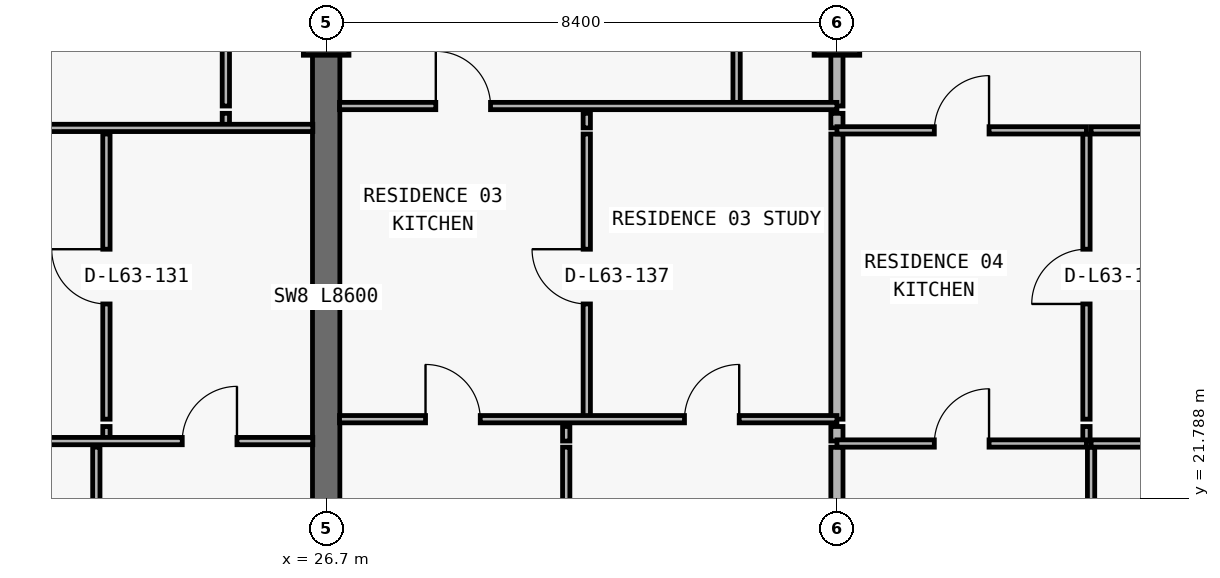
"""IFC4 building model, lengths in metres.
Left out: names, types, materials, properties, quantities, classifications, styles, units other than length and angle.
Written with IfcOpenShell. Run it as: python <this file> out.ifc"""

import sys

from ifc_helpers import new_model, si_unit, direction, frame, frame_2d, origin, origin_2d, place, context, subcontext, project, spatial, rectangle, extrude, element, fill, save


model = new_model("IFC4")
c1 = context("Model", 3, precision=1e-05, world=origin(), true_north=direction((0.0, 1.0)))
c2 = subcontext(c1, "Body", "Model", "MODEL_VIEW")
j1 = project(units=[si_unit("LENGTHUNIT", "METRE"), si_unit("PLANEANGLEUNIT", "RADIAN")], contexts=[c1])
p1 = place(None, origin())
s1 = spatial("IfcSite", under=j1, at=p1, CompositionType="ELEMENT")
p2 = place(p1, origin())
s2 = spatial("IfcBuilding", under=s1, at=p2, CompositionType="ELEMENT")
p3 = place(p2, frame((0.0, 0.0, 226.5)))
s3 = spatial("IfcBuildingStorey", under=s2, at=p3, CompositionType="ELEMENT", Elevation=226.5)
for number, where, z_axis, x_axis in (
    (1, (26.7, 29.4, 0.0), (0.0, 0.0, 1.0), (1.0, 0.0, 0.0)),
    (2, (35.1, 29.4, 0.0), (0.0, 0.0, 1.0), (1.0, 0.0, 0.0)),
):
    element("IfcColumn", number, at=place(p3, frame(where, z_axis=z_axis, x_axis=x_axis)), inside=s3, PredefinedType="COLUMN", context=c2, shape_type="SweptSolid", body=[
        extrude(rectangle(XDim=0.75, YDim=0.65, at=origin_2d()), origin(), (0.0, 0.0, 1.0), 3.05),
    ])
p4 = place(p3, frame((26.7, 20.8, 0.0), z_axis=(0.0, 0.0, 1.0), x_axis=(0.0, 1.0, 0.0)))
e3 = element("IfcWall", 3, at=p4, inside=s3, PredefinedType="SHEAR", context=c2, shape_type="SweptSolid", body=[
    extrude(rectangle(XDim=8.6, YDim=0.45, at=frame_2d((4.3, 0.0))), origin(), (0.0, 0.0, 1.0), 3.05),
])
p5 = place(p3, frame((22.92, 13.34, 0.0), z_axis=(0.0, 0.0, 1.0), x_axis=(0.0, 1.0, 0.0)))
e4 = element("IfcWall", 4, at=p5, inside=s3, PredefinedType="PARTITIONING", context=c2, shape_type="SweptSolid", body=[
    extrude(rectangle(XDim=9.29, YDim=0.12, at=frame_2d((4.645, 0.0))), origin(), (0.0, 0.0, 1.0), 3.05),
])
p6 = place(p3, frame((23.086, 22.73, 0.0), z_axis=(0.0, 0.0, 1.0), x_axis=(0.0, 1.0, 0.0)))
e5 = element("IfcWall", 5, at=p6, inside=s3, PredefinedType="PARTITIONING", context=c2, shape_type="SweptSolid", body=[
    extrude(rectangle(XDim=0.24, YDim=0.12, at=frame_2d((0.12, 0.0))), origin(), (0.0, 0.0, 1.0), 3.05),
])
p7 = place(p3, frame((23.086, 23.09, 0.0), z_axis=(0.0, 0.0, 1.0), x_axis=(0.0, 1.0, 0.0)))
e6 = element("IfcWall", 6, at=p7, inside=s3, PredefinedType="PARTITIONING", context=c2, shape_type="SweptSolid", body=[
    extrude(rectangle(XDim=4.69, YDim=0.12, at=frame_2d((2.345, 0.0))), origin(), (0.0, 0.0, 1.0), 3.05),
])
p8 = place(p7, frame((1.895, 0.0, 0.0)))
e7 = element("IfcOpeningElement", 7, at=p8, cuts=e6, PredefinedType="OPENING", context=c2, shape_type="SweptSolid", body=[
    extrude(rectangle(XDim=0.9, YDim=2.15, at=frame_2d((0.45, 1.075))), frame((0.0, 0.07, 0.0), z_axis=(0.0, -1.0, 0.0), x_axis=(1.0, 0.0, 0.0)), (0.0, 0.0, 1.0), 0.14),
])
p9 = place(p3, frame((25.05, 27.88, 0.0), z_axis=(0.0, 0.0, 1.0), x_axis=(0.0, 1.0, 0.0)))
e8 = element("IfcWall", 8, at=p9, inside=s3, PredefinedType="PARTITIONING", context=c2, shape_type="SweptSolid", body=[
    extrude(rectangle(XDim=0.24, YDim=0.12, at=frame_2d((0.12, 0.0))), origin(), (0.0, 0.0, 1.0), 3.05),
])
p10 = place(p3, frame((25.05, 28.24, 0.0), z_axis=(0.0, 0.0, 1.0), x_axis=(0.0, 1.0, 0.0)))
e9 = element("IfcWall", 9, at=p10, inside=s3, PredefinedType="PARTITIONING", context=c2, shape_type="SweptSolid", body=[
    extrude(rectangle(XDim=6.26, YDim=0.12, at=frame_2d((3.13, 0.0))), origin(), (0.0, 0.0, 1.0), 3.05),
])
p11 = place(p10, frame((2.705, 0.0, 0.0)))
e10 = element("IfcOpeningElement", 10, at=p11, cuts=e9, PredefinedType="OPENING", context=c2, shape_type="SweptSolid", body=[
    extrude(rectangle(XDim=0.85, YDim=2.1, at=frame_2d((0.425, 1.05))), frame((0.0, 0.07, 0.0), z_axis=(0.0, -1.0, 0.0), x_axis=(1.0, 0.0, 0.0)), (0.0, 0.0, 1.0), 0.14),
])
p12 = place(p3, frame((30.648, 13.34, 0.0), z_axis=(0.0, 0.0, 1.0), x_axis=(0.0, 1.0, 0.0)))
e11 = element("IfcWall", 11, at=p12, inside=s3, PredefinedType="PARTITIONING", context=c2, shape_type="SweptSolid", body=[
    extrude(rectangle(XDim=9.29, YDim=0.12, at=frame_2d((4.645, 0.0))), origin(), (0.0, 0.0, 1.0), 3.05),
])
p13 = place(p3, frame((30.648, 22.73, 0.0), z_axis=(0.0, 0.0, 1.0), x_axis=(0.0, 1.0, 0.0)))
e12 = element("IfcWall", 12, at=p13, inside=s3, PredefinedType="PARTITIONING", context=c2, shape_type="SweptSolid", body=[
    extrude(rectangle(XDim=0.24, YDim=0.12, at=frame_2d((0.12, 0.0))), origin(), (0.0, 0.0, 1.0), 3.05),
])
p14 = place(p3, frame((30.986, 23.09, 0.0), z_axis=(0.0, 0.0, 1.0), x_axis=(0.0, 1.0, 0.0)))
e13 = element("IfcWall", 13, at=p14, inside=s3, PredefinedType="PARTITIONING", context=c2, shape_type="SweptSolid", body=[
    extrude(rectangle(XDim=4.69, YDim=0.12, at=frame_2d((2.345, 0.0))), origin(), (0.0, 0.0, 1.0), 2.629),
])
p15 = place(p14, frame((1.895, 0.0, 0.0)))
e14 = element("IfcOpeningElement", 14, at=p15, cuts=e13, PredefinedType="OPENING", context=c2, shape_type="SweptSolid", body=[
    extrude(rectangle(XDim=0.9, YDim=2.15, at=frame_2d((0.45, 1.075))), frame((0.0, 0.07, 0.0), z_axis=(0.0, -1.0, 0.0), x_axis=(1.0, 0.0, 0.0)), (0.0, 0.0, 1.0), 0.14),
])
p16 = place(p3, frame((30.986, 27.88, 0.0), z_axis=(0.0, 0.0, 1.0), x_axis=(0.0, 1.0, 0.0)))
e15 = element("IfcWall", 15, at=p16, inside=s3, PredefinedType="PARTITIONING", context=c2, shape_type="SweptSolid", body=[
    extrude(rectangle(XDim=0.24, YDim=0.12, at=frame_2d((0.12, 0.0))), origin(), (0.0, 0.0, 1.0), 2.629),
])
p17 = place(p3, frame((33.45, 28.24, 0.0), z_axis=(0.0, 0.0, 1.0), x_axis=(0.0, 1.0, 0.0)))
e16 = element("IfcWall", 16, at=p17, inside=s3, PredefinedType="PARTITIONING", context=c2, shape_type="SweptSolid", body=[
    extrude(rectangle(XDim=6.26, YDim=0.12, at=frame_2d((3.13, 0.0))), origin(), (0.0, 0.0, 1.0), 3.05),
])
p18 = place(p17, frame((2.705, 0.0, 0.0)))
e17 = element("IfcOpeningElement", 17, at=p18, cuts=e16, PredefinedType="OPENING", context=c2, shape_type="SweptSolid", body=[
    extrude(rectangle(XDim=0.85, YDim=2.1, at=frame_2d((0.425, 1.05))), frame((0.0, 0.07, 0.0), z_axis=(0.0, -1.0, 0.0), x_axis=(1.0, 0.0, 0.0)), (0.0, 0.0, 1.0), 0.14),
])
p19 = place(p3, frame((35.1, 13.34, 0.0), z_axis=(0.0, 0.0, 1.0), x_axis=(0.0, 1.0, 0.0)))
e18 = element("IfcWall", 18, at=p19, inside=s3, PredefinedType="PARTITIONING", context=c2, shape_type="SweptSolid", body=[
    extrude(rectangle(XDim=9.29, YDim=0.2, at=frame_2d((4.645, 0.0))), origin(), (0.0, 0.0, 1.0), 2.263),
])
p20 = place(p3, frame((35.1, 22.73, 0.0), z_axis=(0.0, 0.0, 1.0), x_axis=(0.0, 1.0, 0.0)))
e19 = element("IfcWall", 19, at=p20, inside=s3, PredefinedType="PARTITIONING", context=c2, shape_type="SweptSolid", body=[
    extrude(rectangle(XDim=0.24, YDim=0.2, at=frame_2d((0.12, 0.0))), origin(), (0.0, 0.0, 1.0), 2.263),
])
p21 = place(p3, frame((35.1, 23.09, 0.0), z_axis=(0.0, 0.0, 1.0), x_axis=(0.0, 1.0, 0.0)))
e20 = element("IfcWall", 20, at=p21, inside=s3, PredefinedType="PARTITIONING", context=c2, shape_type="SweptSolid", body=[
    extrude(rectangle(XDim=4.69, YDim=0.2, at=frame_2d((2.345, 0.0))), origin(), (0.0, 0.0, 1.0), 2.263),
])
p22 = place(p3, frame((35.1, 27.88, 0.0), z_axis=(0.0, 0.0, 1.0), x_axis=(0.0, 1.0, 0.0)))
e21 = element("IfcWall", 21, at=p22, inside=s3, PredefinedType="PARTITIONING", context=c2, shape_type="SweptSolid", body=[
    extrude(rectangle(XDim=0.24, YDim=0.2, at=frame_2d((0.12, 0.0))), origin(), (0.0, 0.0, 1.0), 2.263),
])
p23 = place(p3, frame((35.1, 28.24, 0.0), z_axis=(0.0, 0.0, 1.0), x_axis=(0.0, 1.0, 0.0)))
e22 = element("IfcWall", 22, at=p23, inside=s3, PredefinedType="PARTITIONING", context=c2, shape_type="SweptSolid", body=[
    extrude(rectangle(XDim=6.26, YDim=0.2, at=frame_2d((3.13, 0.0))), origin(), (0.0, 0.0, 1.0), 2.263),
])
p24 = place(p3, frame((39.204, 22.73, 0.0), z_axis=(0.0, 0.0, 1.0), x_axis=(0.0, 1.0, 0.0)))
e23 = element("IfcWall", 23, at=p24, inside=s3, PredefinedType="PARTITIONING", context=c2, shape_type="SweptSolid", body=[
    extrude(rectangle(XDim=0.24, YDim=0.12, at=frame_2d((0.12, 0.0))), origin(), (0.0, 0.0, 1.0), 3.05),
])
p25 = place(p3, frame((39.204, 23.09, 0.0), z_axis=(0.0, 0.0, 1.0), x_axis=(0.0, 1.0, 0.0)))
e24 = element("IfcWall", 24, at=p25, inside=s3, PredefinedType="PARTITIONING", context=c2, shape_type="SweptSolid", body=[
    extrude(rectangle(XDim=4.69, YDim=0.12, at=frame_2d((2.345, 0.0))), origin(), (0.0, 0.0, 1.0), 3.05),
])
p26 = place(p25, frame((1.895, 0.0, 0.0)))
e25 = element("IfcOpeningElement", 25, at=p26, cuts=e24, PredefinedType="OPENING", context=c2, shape_type="SweptSolid", body=[
    extrude(rectangle(XDim=0.9, YDim=2.15, at=frame_2d((0.45, 1.075))), frame((0.0, 0.07, 0.0), z_axis=(0.0, -1.0, 0.0), x_axis=(1.0, 0.0, 0.0)), (0.0, 0.0, 1.0), 0.14),
])
p27 = place(p3, frame((39.28, 13.34, 0.0), z_axis=(0.0, 0.0, 1.0), x_axis=(0.0, 1.0, 0.0)))
e26 = element("IfcWall", 26, at=p27, inside=s3, PredefinedType="PARTITIONING", context=c2, shape_type="SweptSolid", body=[
    extrude(rectangle(XDim=9.29, YDim=0.12, at=frame_2d((4.645, 0.0))), origin(), (0.0, 0.0, 1.0), 3.05),
])
p28 = place(p3, frame((35.1, 22.69, 0.0), z_axis=(0.0, 0.0, 1.0), x_axis=(1.0, 0.0, 0.0)))
e27 = element("IfcWall", 27, at=p28, inside=s3, PredefinedType="PARTITIONING", context=c2, shape_type="SweptSolid", body=[
    extrude(rectangle(XDim=4.104, YDim=0.12, at=frame_2d((2.052, 0.0))), origin(), (0.0, 0.0, 1.0), 3.05),
])
p29 = place(p28, frame((1.602, 0.0, 0.0)))
e28 = element("IfcOpeningElement", 28, at=p29, cuts=e27, PredefinedType="OPENING", context=c2, shape_type="SweptSolid", body=[
    extrude(rectangle(XDim=0.9, YDim=2.15, at=frame_2d((0.45, 1.075))), frame((0.0, 0.07, 0.0), z_axis=(0.0, -1.0, 0.0), x_axis=(1.0, 0.0, 0.0)), (0.0, 0.0, 1.0), 0.14),
])
p30 = place(p3, frame((39.28, 22.69, 0.0), z_axis=(0.0, 0.0, 1.0), x_axis=(1.0, 0.0, 0.0)))
e29 = element("IfcWall", 29, at=p30, inside=s3, PredefinedType="PARTITIONING", context=c2, shape_type="SweptSolid", body=[
    extrude(rectangle(XDim=3.42, YDim=0.12, at=frame_2d((1.71, 0.0))), origin(), (0.0, 0.0, 1.0), 3.05),
])
p31 = place(p30, frame((1.26, 0.0, 0.0)))
e30 = element("IfcOpeningElement", 30, at=p31, cuts=e29, PredefinedType="OPENING", context=c2, shape_type="SweptSolid", body=[
    extrude(rectangle(XDim=0.9, YDim=2.15, at=frame_2d((0.45, 1.075))), frame((0.0, 0.07, 0.0), z_axis=(0.0, -1.0, 0.0), x_axis=(1.0, 0.0, 0.0)), (0.0, 0.0, 1.0), 0.14),
])
p32 = place(p3, frame((18.3, 22.73, 0.0), z_axis=(0.0, 0.0, 1.0), x_axis=(1.0, 0.0, 0.0)))
e31 = element("IfcWall", 31, at=p32, inside=s3, PredefinedType="PARTITIONING", context=c2, shape_type="SweptSolid", body=[
    extrude(rectangle(XDim=8.18, YDim=0.12, at=frame_2d((4.09, 0.0))), origin(), (0.0, 0.0, 1.0), 3.05),
])
p33 = place(p32, frame((1.86, 0.0, 0.0)))
e32 = element("IfcOpeningElement", 32, at=p33, cuts=e31, PredefinedType="OPENING", context=c2, shape_type="SweptSolid", body=[
    extrude(rectangle(XDim=0.9, YDim=2.15, at=frame_2d((0.45, 1.075))), frame((0.0, 0.07, 0.0), z_axis=(0.0, -1.0, 0.0), x_axis=(1.0, 0.0, 0.0)), (0.0, 0.0, 1.0), 0.14),
])
p34 = place(p32, frame((6.033, 0.0, 0.0)))
e33 = element("IfcOpeningElement", 33, at=p34, cuts=e31, PredefinedType="OPENING", context=c2, shape_type="SweptSolid", body=[
    extrude(rectangle(XDim=0.9, YDim=2.15, at=frame_2d((0.45, 1.075))), frame((0.0, 0.07, 0.0), z_axis=(0.0, -1.0, 0.0), x_axis=(1.0, 0.0, 0.0)), (0.0, 0.0, 1.0), 0.14),
])
p35 = place(p3, frame((26.92, 23.09, 0.0), z_axis=(0.0, 0.0, 1.0), x_axis=(1.0, 0.0, 0.0)))
e34 = element("IfcWall", 34, at=p35, inside=s3, PredefinedType="PARTITIONING", context=c2, shape_type="SweptSolid", body=[
    extrude(rectangle(XDim=8.18, YDim=0.12, at=frame_2d((4.09, 0.0))), origin(), (0.0, 0.0, 1.0), 3.05),
])
p36 = place(p35, frame((1.414, 0.0, 0.0)))
e35 = element("IfcOpeningElement", 35, at=p36, cuts=e34, PredefinedType="OPENING", context=c2, shape_type="SweptSolid", body=[
    extrude(rectangle(XDim=0.9, YDim=2.15, at=frame_2d((0.45, 1.075))), frame((0.0, 0.07, 0.0), z_axis=(0.0, -1.0, 0.0), x_axis=(1.0, 0.0, 0.0)), (0.0, 0.0, 1.0), 0.14),
])
p37 = place(p35, frame((5.673, 0.0, 0.0)))
e36 = element("IfcOpeningElement", 36, at=p37, cuts=e34, PredefinedType="OPENING", context=c2, shape_type="SweptSolid", body=[
    extrude(rectangle(XDim=0.9, YDim=2.15, at=frame_2d((0.45, 1.075))), frame((0.0, 0.07, 0.0), z_axis=(0.0, -1.0, 0.0), x_axis=(1.0, 0.0, 0.0)), (0.0, 0.0, 1.0), 0.14),
])
p38 = place(p3, frame((35.1, 27.84, 0.0), z_axis=(0.0, 0.0, 1.0), x_axis=(1.0, 0.0, 0.0)))
e37 = element("IfcWall", 37, at=p38, inside=s3, PredefinedType="PARTITIONING", context=c2, shape_type="SweptSolid", body=[
    extrude(rectangle(XDim=4.104, YDim=0.12, at=frame_2d((2.052, 0.0))), origin(), (0.0, 0.0, 1.0), 3.05),
])
p39 = place(p38, frame((1.602, 0.0, 0.0)))
e38 = element("IfcOpeningElement", 38, at=p39, cuts=e37, PredefinedType="OPENING", context=c2, shape_type="SweptSolid", body=[
    extrude(rectangle(XDim=0.9, YDim=2.15, at=frame_2d((0.45, 1.075))), frame((0.0, 0.07, 0.0), z_axis=(0.0, -1.0, 0.0), x_axis=(1.0, 0.0, 0.0)), (0.0, 0.0, 1.0), 0.14),
])
p40 = place(p3, frame((39.28, 27.84, 0.0), z_axis=(0.0, 0.0, 1.0), x_axis=(1.0, 0.0, 0.0)))
e39 = element("IfcWall", 39, at=p40, inside=s3, PredefinedType="PARTITIONING", context=c2, shape_type="SweptSolid", body=[
    extrude(rectangle(XDim=3.42, YDim=0.12, at=frame_2d((1.71, 0.0))), origin(), (0.0, 0.0, 1.0), 3.05),
])
p41 = place(p3, frame((18.3, 27.88, 0.0), z_axis=(0.0, 0.0, 1.0), x_axis=(1.0, 0.0, 0.0)))
e40 = element("IfcWall", 40, at=p41, inside=s3, PredefinedType="PARTITIONING", context=c2, shape_type="SweptSolid", body=[
    extrude(rectangle(XDim=8.18, YDim=0.12, at=frame_2d((4.09, 0.0))), origin(), (0.0, 0.0, 1.0), 3.05),
])
p42 = place(p41, frame((1.943, 0.0, 0.0)))
e41 = element("IfcOpeningElement", 41, at=p42, cuts=e40, PredefinedType="OPENING", context=c2, shape_type="SweptSolid", body=[
    extrude(rectangle(XDim=0.9, YDim=2.15, at=frame_2d((0.45, 1.075))), frame((0.0, 0.07, 0.0), z_axis=(0.0, -1.0, 0.0), x_axis=(1.0, 0.0, 0.0)), (0.0, 0.0, 1.0), 0.14),
])
p43 = place(p3, frame((26.92, 28.24, 0.0), z_axis=(0.0, 0.0, 1.0), x_axis=(1.0, 0.0, 0.0)))
e42 = element("IfcWall", 42, at=p43, inside=s3, PredefinedType="PARTITIONING", context=c2, shape_type="SweptSolid", body=[
    extrude(rectangle(XDim=8.18, YDim=0.12, at=frame_2d((4.09, 0.0))), origin(), (0.0, 0.0, 1.0), 3.05),
])
p44 = place(p43, frame((1.583, 0.0, 0.0)))
e43 = element("IfcOpeningElement", 43, at=p44, cuts=e42, PredefinedType="OPENING", context=c2, shape_type="SweptSolid", body=[
    extrude(rectangle(XDim=0.9, YDim=2.15, at=frame_2d((0.45, 1.075))), frame((0.0, 0.07, 0.0), z_axis=(0.0, -1.0, 0.0), x_axis=(1.0, 0.0, 0.0)), (0.0, 0.0, 1.0), 0.14),
])
p45 = place(p8, origin())
e44 = element("IfcDoor", 44, at=p45, inside=s3, OperationType="SINGLE_SWING_RIGHT", PredefinedType="DOOR", context=c2, shape_type="SweptSolid", body=[
    extrude(rectangle(XDim=0.9, YDim=2.15, at=frame_2d((0.45, 1.075))), frame((0.0, 0.025, 0.0), z_axis=(0.0, -1.0, 0.0), x_axis=(1.0, 0.0, 0.0)), (0.0, 0.0, 1.0), 0.05),
])
fill(e7, e44)
p46 = place(p34, origin())
e45 = element("IfcDoor", 45, at=p46, inside=s3, OperationType="SINGLE_SWING_RIGHT", PredefinedType="DOOR", context=c2, shape_type="SweptSolid", body=[
    extrude(rectangle(XDim=0.9, YDim=2.15, at=frame_2d((0.45, 1.075))), frame((0.0, 0.025, 0.0), z_axis=(0.0, -1.0, 0.0), x_axis=(1.0, 0.0, 0.0)), (0.0, 0.0, 1.0), 0.05),
])
fill(e33, e45)
p47 = place(p44, origin())
e46 = element("IfcDoor", 46, at=p47, inside=s3, OperationType="SINGLE_SWING_LEFT", PredefinedType="DOOR", context=c2, shape_type="SweptSolid", body=[
    extrude(rectangle(XDim=0.9, YDim=2.15, at=frame_2d((0.45, 1.075))), frame((0.0, 0.025, 0.0), z_axis=(0.0, -1.0, 0.0), x_axis=(1.0, 0.0, 0.0)), (0.0, 0.0, 1.0), 0.05),
])
fill(e43, e46)
p48 = place(p15, origin())
e47 = element("IfcDoor", 47, at=p48, inside=s3, OperationType="SINGLE_SWING_RIGHT", PredefinedType="DOOR", context=c2, shape_type="SweptSolid", body=[
    extrude(rectangle(XDim=0.9, YDim=2.15, at=frame_2d((0.45, 1.075))), frame((0.0, 0.025, 0.0), z_axis=(0.0, -1.0, 0.0), x_axis=(1.0, 0.0, 0.0)), (0.0, 0.0, 1.0), 0.05),
])
fill(e14, e47)
p49 = place(p36, origin())
e48 = element("IfcDoor", 48, at=p49, inside=s3, OperationType="SINGLE_SWING_LEFT", PredefinedType="DOOR", context=c2, shape_type="SweptSolid", body=[
    extrude(rectangle(XDim=0.9, YDim=2.15, at=frame_2d((0.45, 1.075))), frame((0.0, 0.025, 0.0), z_axis=(0.0, -1.0, 0.0), x_axis=(1.0, 0.0, 0.0)), (0.0, 0.0, 1.0), 0.05),
])
fill(e35, e48)
p50 = place(p37, origin())
e49 = element("IfcDoor", 49, at=p50, inside=s3, OperationType="SINGLE_SWING_RIGHT", PredefinedType="DOOR", context=c2, shape_type="SweptSolid", body=[
    extrude(rectangle(XDim=0.9, YDim=2.15, at=frame_2d((0.45, 1.075))), frame((0.0, 0.025, 0.0), z_axis=(0.0, -1.0, 0.0), x_axis=(1.0, 0.0, 0.0)), (0.0, 0.0, 1.0), 0.05),
])
fill(e36, e49)
p51 = place(p39, origin())
e50 = element("IfcDoor", 50, at=p51, inside=s3, OperationType="SINGLE_SWING_RIGHT", PredefinedType="DOOR", context=c2, shape_type="SweptSolid", body=[
    extrude(rectangle(XDim=0.9, YDim=2.15, at=frame_2d((0.45, 1.075))), frame((0.0, 0.025, 0.0), z_axis=(0.0, -1.0, 0.0), x_axis=(1.0, 0.0, 0.0)), (0.0, 0.0, 1.0), 0.05),
])
fill(e38, e50)
p52 = place(p26, origin())
e51 = element("IfcDoor", 51, at=p52, inside=s3, OperationType="SINGLE_SWING_LEFT", PredefinedType="DOOR", context=c2, shape_type="SweptSolid", body=[
    extrude(rectangle(XDim=0.9, YDim=2.15, at=frame_2d((0.45, 1.075))), frame((0.0, 0.025, 0.0), z_axis=(0.0, -1.0, 0.0), x_axis=(1.0, 0.0, 0.0)), (0.0, 0.0, 1.0), 0.05),
])
fill(e25, e51)
p53 = place(p29, origin())
e52 = element("IfcDoor", 52, at=p53, inside=s3, OperationType="SINGLE_SWING_RIGHT", PredefinedType="DOOR", context=c2, shape_type="SweptSolid", body=[
    extrude(rectangle(XDim=0.9, YDim=2.15, at=frame_2d((0.45, 1.075))), frame((0.0, 0.025, 0.0), z_axis=(0.0, -1.0, 0.0), x_axis=(1.0, 0.0, 0.0)), (0.0, 0.0, 1.0), 0.05),
])
fill(e28, e52)
save(model, sys.argv[1])
